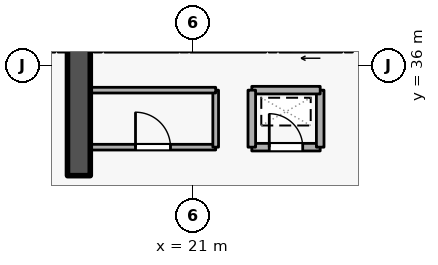
"""IFC4 building model, lengths in metres.
Left out: names, types, materials, properties, quantities, classifications, styles, units other than length and angle.
Written with IfcOpenShell. Run it as: python <this file> out.ifc"""

import sys

from ifc_helpers import new_model, si_unit, direction, frame, frame_2d, origin, place, context, subcontext, project, spatial, rectangle, extrude, element, fill, save


model = new_model("IFC4")
c1 = context("Model", 3, precision=1e-05, world=origin(), true_north=direction((0.0, 1.0)))
c2 = subcontext(c1, "Body", "Model", "MODEL_VIEW")
j1 = project(units=[si_unit("LENGTHUNIT", "METRE"), si_unit("PLANEANGLEUNIT", "RADIAN")], contexts=[c1])
p1 = place(None, origin())
s1 = spatial("IfcSite", under=j1, at=p1, CompositionType="ELEMENT")
p2 = place(p1, origin())
s2 = spatial("IfcBuilding", under=s1, at=p2, CompositionType="ELEMENT")
p3 = place(p2, frame((0.0, 0.0, 9.6)))
s3 = spatial("IfcBuildingStorey", under=s2, at=p3, CompositionType="ELEMENT", Elevation=9.6)
p4 = place(p3, frame((18.0, 33.1, 0.0), z_axis=(0.0, 0.0, 1.0), x_axis=(0.0, 1.0, 0.0)))
e1 = element("IfcWall", 1, at=p4, inside=s3, PredefinedType="SHEAR", context=c2, shape_type="SweptSolid", body=[
    extrude(rectangle(XDim=5.7, YDim=0.6, at=frame_2d((2.85, 0.0))), origin(), (0.0, 0.0, 1.0), 4.5),
])
p5 = place(p3, frame((24.92, 36.45, 0.0), z_axis=(0.0, 0.0, 1.0), x_axis=(-1.0, 0.0, 0.0)))
e2 = element("IfcWall", 2, at=p5, inside=s3, PredefinedType="STANDARD", context=c2, shape_type="SweptSolid", body=[
    extrude(rectangle(XDim=1.64, YDim=0.2, at=frame_2d((0.82, 0.0))), origin(), (0.0, 0.0, 1.0), 4.16),
])
p6 = place(p5, frame((0.31, 0.0, 0.0)))
e3 = element("IfcOpeningElement", 3, at=p6, cuts=e2, PredefinedType="OPENING", context=c2, shape_type="SweptSolid", body=[
    extrude(rectangle(XDim=1.02, YDim=2.06, at=frame_2d((0.51, 1.03))), frame((0.0, 0.11, 0.0), z_axis=(0.0, -1.0, 0.0), x_axis=(1.0, 0.0, 0.0)), (0.0, 0.0, 1.0), 0.22),
])
p7 = place(p3, frame((22.92, 36.45, 0.0), z_axis=(0.0, 0.0, 1.0), x_axis=(-1.0, 0.0, 0.0)))
e4 = element("IfcWall", 4, at=p7, inside=s3, PredefinedType="STANDARD", context=c2, shape_type="SweptSolid", body=[
    extrude(rectangle(XDim=1.99, YDim=0.2, at=frame_2d((0.995, 0.0))), origin(), (0.0, 0.0, 1.0), 4.16),
])
p8 = place(p3, frame((20.62, 36.45, 0.0), z_axis=(0.0, 0.0, 1.0), x_axis=(-1.0, 0.0, 0.0)))
e5 = element("IfcWall", 5, at=p8, inside=s3, PredefinedType="STANDARD", context=c2, shape_type="SweptSolid", body=[
    extrude(rectangle(XDim=1.94, YDim=0.2, at=frame_2d((0.97, 0.0))), origin(), (0.0, 0.0, 1.0), 4.16),
])
p9 = place(p3, frame((17.37, 36.45, 0.0), z_axis=(0.0, 0.0, 1.0), x_axis=(-1.0, 0.0, 0.0)))
e6 = element("IfcWall", 6, at=p9, inside=s3, PredefinedType="STANDARD", context=c2, shape_type="SweptSolid", body=[
    extrude(rectangle(XDim=1.74, YDim=0.2, at=frame_2d((0.87, 0.0))), origin(), (0.0, 0.0, 1.0), 4.16),
])
p10 = place(p3, frame((22.55, 33.85, 0.0), z_axis=(0.0, 0.0, 1.0), x_axis=(1.0, 0.0, 0.0)))
e7 = element("IfcWall", 7, at=p10, inside=s3, PredefinedType="STANDARD", context=c2, shape_type="SweptSolid", body=[
    extrude(rectangle(XDim=1.8, YDim=0.2, at=frame_2d((0.9, 0.0))), origin(), (0.0, 0.0, 1.0), 4.16),
])
p11 = place(p10, frame((0.46, 0.0, 0.0)))
e8 = element("IfcOpeningElement", 8, at=p11, cuts=e7, PredefinedType="OPENING", context=c2, shape_type="SweptSolid", body=[
    extrude(rectangle(XDim=0.88, YDim=2.04, at=frame_2d((0.44, 1.02))), frame((0.0, 0.11, 0.0), z_axis=(0.0, -1.0, 0.0), x_axis=(1.0, 0.0, 0.0)), (0.0, 0.0, 1.0), 0.22),
])
p12 = place(p3, frame((24.35, 33.85, 0.0), z_axis=(0.0, 0.0, 1.0), x_axis=(0.0, 1.0, 0.0)))
e9 = element("IfcWall", 9, at=p12, inside=s3, PredefinedType="STANDARD", context=c2, shape_type="SweptSolid", body=[
    extrude(rectangle(XDim=1.5, YDim=0.2, at=frame_2d((0.75, 0.0))), origin(), (0.0, 0.0, 1.0), 4.16),
])
p13 = place(p3, frame((24.35, 35.35, 0.0), z_axis=(0.0, 0.0, 1.0), x_axis=(-1.0, 0.0, 0.0)))
e10 = element("IfcWall", 10, at=p13, inside=s3, PredefinedType="STANDARD", context=c2, shape_type="SweptSolid", body=[
    extrude(rectangle(XDim=1.8, YDim=0.2, at=frame_2d((0.9, 0.0))), origin(), (0.0, 0.0, 1.0), 4.16),
])
p14 = place(p3, frame((22.55, 35.35, 0.0), z_axis=(0.0, 0.0, 1.0), x_axis=(0.0, -1.0, 0.0)))
e11 = element("IfcWall", 11, at=p14, inside=s3, PredefinedType="STANDARD", context=c2, shape_type="SweptSolid", body=[
    extrude(rectangle(XDim=1.5, YDim=0.2, at=frame_2d((0.75, 0.0))), origin(), (0.0, 0.0, 1.0), 4.16),
])
p15 = place(p3, frame((18.3, 33.85, 0.0), z_axis=(0.0, 0.0, 1.0), x_axis=(1.0, 0.0, 0.0)))
e12 = element("IfcWall", 12, at=p15, inside=s3, PredefinedType="PARTITIONING", context=c2, shape_type="SweptSolid", body=[
    extrude(rectangle(XDim=3.3, YDim=0.15, at=frame_2d((1.65, 0.0))), origin(), (0.0, 0.0, 1.0), 4.16),
])
p16 = place(p15, frame((1.19, 0.0, 0.0)))
e13 = element("IfcOpeningElement", 13, at=p16, cuts=e12, PredefinedType="OPENING", context=c2, shape_type="SweptSolid", body=[
    extrude(rectangle(XDim=0.92, YDim=2.08, at=frame_2d((0.46, 1.04))), frame((0.0, 0.085, 0.0), z_axis=(0.0, -1.0, 0.0), x_axis=(1.0, 0.0, 0.0)), (0.0, 0.0, 1.0), 0.17),
])
p17 = place(p3, frame((21.6, 33.85, 0.0), z_axis=(0.0, 0.0, 1.0), x_axis=(0.0, 1.0, 0.0)))
e14 = element("IfcWall", 14, at=p17, inside=s3, PredefinedType="PARTITIONING", context=c2, shape_type="SweptSolid", body=[
    extrude(rectangle(XDim=1.5, YDim=0.15, at=frame_2d((0.75, 0.0))), origin(), (0.0, 0.0, 1.0), 4.16),
])
p18 = place(p3, frame((21.6, 35.35, 0.0), z_axis=(0.0, 0.0, 1.0), x_axis=(-1.0, 0.0, 0.0)))
e15 = element("IfcWall", 15, at=p18, inside=s3, PredefinedType="PARTITIONING", context=c2, shape_type="SweptSolid", body=[
    extrude(rectangle(XDim=3.3, YDim=0.15, at=frame_2d((1.65, 0.0))), origin(), (0.0, 0.0, 1.0), 4.16),
])
p19 = place(p11, origin())
e16 = element("IfcDoor", 16, at=p19, inside=s3, OperationType="SINGLE_SWING_LEFT", PredefinedType="DOOR", context=c2, shape_type="SweptSolid", body=[
    extrude(rectangle(XDim=0.88, YDim=2.04, at=frame_2d((0.44, 1.02))), frame((0.0, 0.025, 0.0), z_axis=(0.0, -1.0, 0.0), x_axis=(1.0, 0.0, 0.0)), (0.0, 0.0, 1.0), 0.05),
])
fill(e8, e16)
p20 = place(p16, origin())
e17 = element("IfcDoor", 17, at=p20, inside=s3, OperationType="SINGLE_SWING_LEFT", PredefinedType="DOOR", context=c2, shape_type="SweptSolid", body=[
    extrude(rectangle(XDim=0.92, YDim=2.08, at=frame_2d((0.46, 1.04))), frame((0.0, 0.025, 0.0), z_axis=(0.0, -1.0, 0.0), x_axis=(1.0, 0.0, 0.0)), (0.0, 0.0, 1.0), 0.05),
])
fill(e13, e17)
save(model, sys.argv[1])
